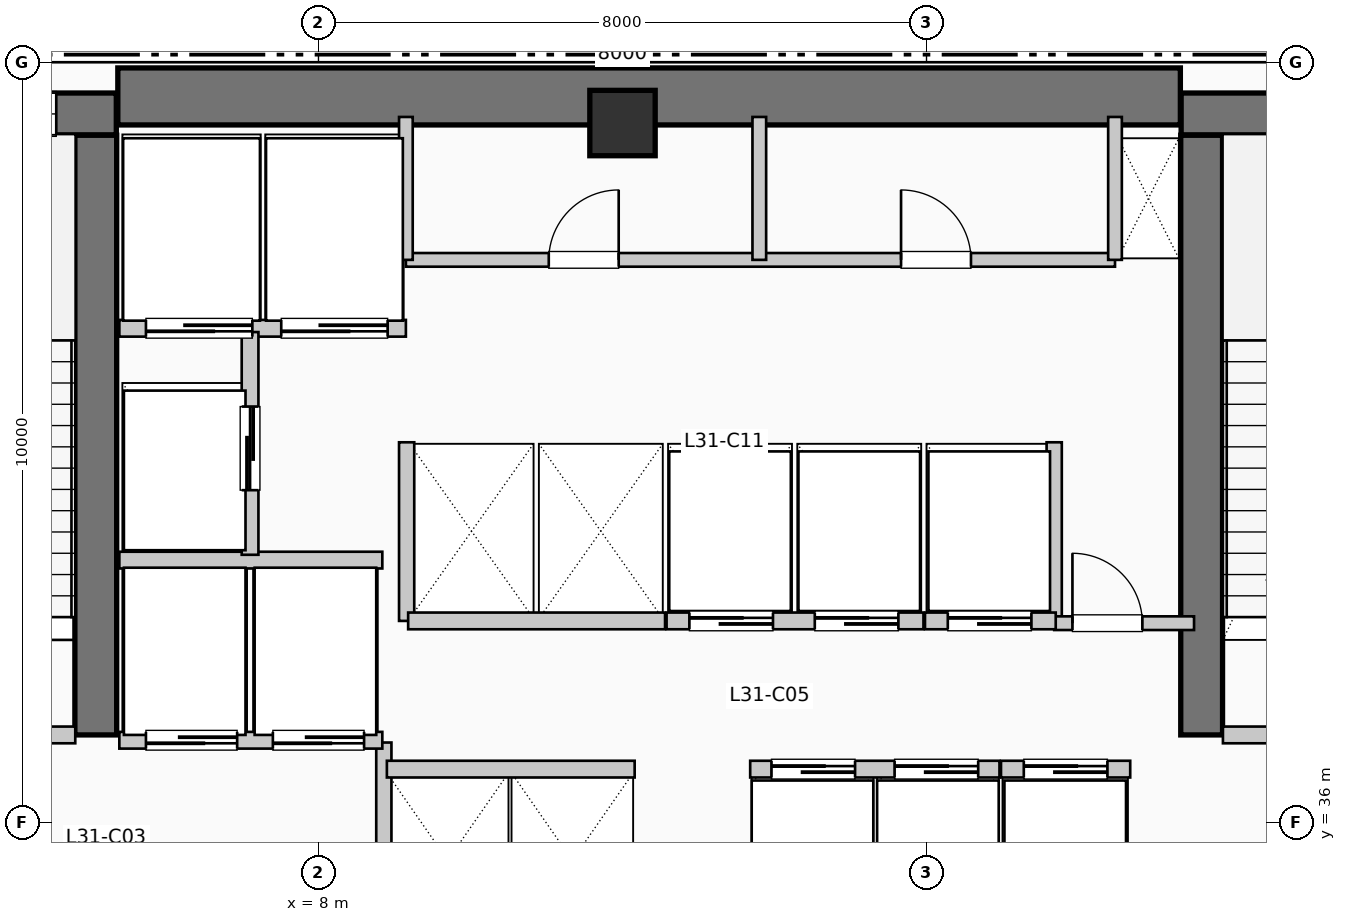
"""IFC4 building model, lengths in metres.
Left out: names, types, materials, properties, quantities, classifications, styles, units other than length and angle.
Written with IfcOpenShell. Run it as: python <this file> out.ifc"""

import sys

from ifc_helpers import new_model, si_unit, direction, frame, frame_2d, origin, origin_2d, place, context, subcontext, project, spatial, rectangle, extrude, element, fill, save


model = new_model("IFC4")
c1 = context("Model", 3, precision=1e-05, world=origin(), true_north=direction((0.0, 1.0)))
c2 = subcontext(c1, "Body", "Model", "MODEL_VIEW")
j1 = project(units=[si_unit("LENGTHUNIT", "METRE"), si_unit("PLANEANGLEUNIT", "RADIAN")], contexts=[c1])
p1 = place(None, origin())
s1 = spatial("IfcSite", under=j1, at=p1, CompositionType="ELEMENT")
p2 = place(p1, origin())
s2 = spatial("IfcBuilding", under=s1, at=p2, CompositionType="ELEMENT")
p3 = place(p2, frame((0.0, 0.0, 130.35)))
s3 = spatial("IfcBuildingStorey", under=s2, at=p3, CompositionType="ELEMENT", Elevation=130.35)
p4 = place(p3, frame((5.36, 45.55, 0.0), z_axis=(0.0, 0.0, 1.0), x_axis=(1.0, 0.0, 0.0)))
e1 = element("IfcWall", 1, at=p4, inside=s3, PredefinedType="SHEAR", context=c2, shape_type="SweptSolid", body=[
    extrude(rectangle(XDim=13.98, YDim=0.75, at=frame_2d((6.99, 0.0))), origin(), (0.0, 0.0, 1.0), 4.62),
])
p5 = place(p3, frame((5.07, 37.15, 0.0), z_axis=(0.0, 0.0, 1.0), x_axis=(0.0, 1.0, 0.0)))
e2 = element("IfcWall", 2, at=p5, inside=s3, PredefinedType="SHEAR", context=c2, shape_type="SweptSolid", body=[
    extrude(rectangle(XDim=7.89, YDim=0.55, at=frame_2d((3.945, 0.0))), origin(), (0.0, 0.0, 1.0), 4.62),
])
p6 = place(p3, frame((1.1, 45.32, 0.0), z_axis=(0.0, 0.0, 1.0), x_axis=(1.0, 0.0, 0.0)))
e3 = element("IfcWall", 3, at=p6, inside=s3, PredefinedType="SHEAR", context=c2, shape_type="SweptSolid", body=[
    extrude(rectangle(XDim=4.24, YDim=0.55, at=frame_2d((2.12, 0.0))), origin(), (0.0, 0.0, 1.0), 4.62),
])
p7 = place(p6, frame((2.05, 0.0, 1.05)))
e4 = element("IfcOpeningElement", 4, at=p7, cuts=e3, PredefinedType="OPENING", context=c2, shape_type="SweptSolid", body=[
    extrude(rectangle(XDim=1.4, YDim=1.8, at=frame_2d((0.7, 0.9))), frame((0.0, 0.285, 0.0), z_axis=(0.0, -1.0, 0.0), x_axis=(1.0, 0.0, 0.0)), (0.0, 0.0, 1.0), 0.57),
])
p8 = place(p3, frame((19.62, 37.15, 0.0), z_axis=(0.0, 0.0, 1.0), x_axis=(0.0, 1.0, 0.0)))
e5 = element("IfcWall", 5, at=p8, inside=s3, PredefinedType="SHEAR", context=c2, shape_type="SweptSolid", body=[
    extrude(rectangle(XDim=7.89, YDim=0.55, at=frame_2d((3.945, 0.0))), origin(), (0.0, 0.0, 1.0), 4.62),
])
p9 = place(p3, frame((19.35, 45.32, 0.0), z_axis=(0.0, 0.0, 1.0), x_axis=(1.0, 0.0, 0.0)))
e6 = element("IfcWall", 6, at=p9, inside=s3, PredefinedType="SHEAR", context=c2, shape_type="SweptSolid", body=[
    extrude(rectangle(XDim=3.69, YDim=0.55, at=frame_2d((1.845, 0.0))), origin(), (0.0, 0.0, 1.0), 4.62),
])
p10 = place(p9, frame((1.15, 0.0, 1.05)))
e7 = element("IfcOpeningElement", 7, at=p10, cuts=e6, PredefinedType="OPENING", context=c2, shape_type="SweptSolid", body=[
    extrude(rectangle(XDim=1.4, YDim=1.8, at=frame_2d((0.7, 0.9))), frame((0.0, 0.285, 0.0), z_axis=(0.0, -1.0, 0.0), x_axis=(1.0, 0.0, 0.0)), (0.0, 0.0, 1.0), 0.57),
])
p11 = place(p3, frame((12.0, 45.2, 0.0), z_axis=(0.0, 0.0, 1.0), x_axis=(1.0, 0.0, 0.0)))
e8 = element("IfcColumn", 8, at=p11, inside=s3, PredefinedType="COLUMN", context=c2, shape_type="SweptSolid", body=[
    extrude(rectangle(XDim=0.86, YDim=0.86, at=origin_2d()), origin(), (0.0, 0.0, 1.0), 4.62),
])
p12 = place(p3, frame((1.65, 37.15, 0.0), z_axis=(0.0, 0.0, 1.0), x_axis=(1.0, 0.0, 0.0)))
e9 = element("IfcWall", 9, at=p12, inside=s3, PredefinedType="PARTITIONING", context=c2, shape_type="SweptSolid", body=[
    extrude(rectangle(XDim=3.15, YDim=0.22, at=frame_2d((1.575, 0.0))), origin(), (0.0, 0.0, 1.0), 4.37),
])
p13 = place(p12, frame((2.05, 0.0, 0.0), z_axis=(0.0, 0.0, 1.0), x_axis=(-1.0, 0.0, 0.0)))
e10 = element("IfcOpeningElement", 10, at=p13, cuts=e9, PredefinedType="OPENING", context=c2, shape_type="SweptSolid", body=[
    extrude(rectangle(XDim=1.05, YDim=2.15, at=frame_2d((0.525, 1.075))), frame((0.0, 0.12, 0.0), z_axis=(0.0, -1.0, 0.0), x_axis=(1.0, 0.0, 0.0)), (0.0, 0.0, 1.0), 0.24),
])
p14 = place(p3, frame((8.86, 34.55, 0.0), z_axis=(0.0, 0.0, 1.0), x_axis=(0.0, 1.0, 0.0)))
e11 = element("IfcWall", 11, at=p14, inside=s3, PredefinedType="PARTITIONING", context=c2, shape_type="SweptSolid", body=[
    extrude(rectangle(XDim=2.5, YDim=0.2, at=frame_2d((1.25, 0.0))), origin(), (0.0, 0.0, 1.0), 4.37),
])
p15 = place(p3, frame((19.9, 37.15, 0.0), z_axis=(0.0, 0.0, 1.0), x_axis=(1.0, 0.0, 0.0)))
e12 = element("IfcWall", 12, at=p15, inside=s3, PredefinedType="PARTITIONING", context=c2, shape_type="SweptSolid", body=[
    extrude(rectangle(XDim=3.15, YDim=0.22, at=frame_2d((1.575, 0.0))), origin(), (0.0, 0.0, 1.0), 4.37),
])
p16 = place(p15, frame((2.05, 0.0, 0.0), z_axis=(0.0, 0.0, 1.0), x_axis=(-1.0, 0.0, 0.0)))
e13 = element("IfcOpeningElement", 13, at=p16, cuts=e12, PredefinedType="OPENING", context=c2, shape_type="SweptSolid", body=[
    extrude(rectangle(XDim=1.05, YDim=2.15, at=frame_2d((0.525, 1.075))), frame((0.0, 0.12, 0.0), z_axis=(0.0, -1.0, 0.0), x_axis=(1.0, 0.0, 0.0)), (0.0, 0.0, 1.0), 0.24),
])
p17 = place(p3, frame((5.38, 37.08, 0.0), z_axis=(0.0, 0.0, 1.0), x_axis=(1.0, 0.0, 0.0)))
e14 = element("IfcWall", 14, at=p17, inside=s3, PredefinedType="PARTITIONING", context=c2, shape_type="SweptSolid", body=[
    extrude(rectangle(XDim=3.46, YDim=0.22, at=frame_2d((1.73, 0.0))), origin(), (0.0, 0.0, 1.0), 4.37),
])
p18 = place(p17, frame((1.55, 0.0, 0.0), z_axis=(0.0, 0.0, 1.0), x_axis=(-1.0, 0.0, 0.0)))
e15 = element("IfcOpeningElement", 15, at=p18, cuts=e14, PredefinedType="OPENING", context=c2, shape_type="SweptSolid", body=[
    extrude(rectangle(XDim=1.2, YDim=2.2, at=frame_2d((0.6, 1.1))), frame((0.0, 0.12, 0.0), z_axis=(0.0, -1.0, 0.0), x_axis=(1.0, 0.0, 0.0)), (0.0, 0.0, 1.0), 0.24),
])
p19 = place(p17, frame((3.22, 0.0, 0.0), z_axis=(0.0, 0.0, 1.0), x_axis=(-1.0, 0.0, 0.0)))
e16 = element("IfcOpeningElement", 16, at=p19, cuts=e14, PredefinedType="OPENING", context=c2, shape_type="SweptSolid", body=[
    extrude(rectangle(XDim=1.2, YDim=2.2, at=frame_2d((0.6, 1.1))), frame((0.0, 0.12, 0.0), z_axis=(0.0, -1.0, 0.0), x_axis=(1.0, 0.0, 0.0)), (0.0, 0.0, 1.0), 0.24),
])
p20 = place(p3, frame((5.38, 39.45, 0.0), z_axis=(0.0, 0.0, 1.0), x_axis=(1.0, 0.0, 0.0)))
e17 = element("IfcWall", 17, at=p20, inside=s3, PredefinedType="PARTITIONING", context=c2, shape_type="SweptSolid", body=[
    extrude(rectangle(XDim=3.46, YDim=0.22, at=frame_2d((1.73, 0.0))), origin(), (0.0, 0.0, 1.0), 4.37),
])
p21 = place(p3, frame((5.38, 42.5, 0.0), z_axis=(0.0, 0.0, 1.0), x_axis=(1.0, 0.0, 0.0)))
e18 = element("IfcWall", 18, at=p21, inside=s3, PredefinedType="PARTITIONING", context=c2, shape_type="SweptSolid", body=[
    extrude(rectangle(XDim=3.77, YDim=0.22, at=frame_2d((1.885, 0.0))), origin(), (0.0, 0.0, 1.0), 4.37),
])
p22 = place(p21, frame((1.75, 0.0, 0.0), z_axis=(0.0, 0.0, 1.0), x_axis=(-1.0, 0.0, 0.0)))
e19 = element("IfcOpeningElement", 19, at=p22, cuts=e18, PredefinedType="OPENING", context=c2, shape_type="SweptSolid", body=[
    extrude(rectangle(XDim=1.4, YDim=2.2, at=frame_2d((0.7, 1.1))), frame((0.0, 0.12, 0.0), z_axis=(0.0, -1.0, 0.0), x_axis=(1.0, 0.0, 0.0)), (0.0, 0.0, 1.0), 0.24),
])
p23 = place(p21, frame((3.53, 0.0, 0.0), z_axis=(0.0, 0.0, 1.0), x_axis=(-1.0, 0.0, 0.0)))
e20 = element("IfcOpeningElement", 20, at=p23, cuts=e18, PredefinedType="OPENING", context=c2, shape_type="SweptSolid", body=[
    extrude(rectangle(XDim=1.4, YDim=2.2, at=frame_2d((0.7, 1.1))), frame((0.0, 0.12, 0.0), z_axis=(0.0, -1.0, 0.0), x_axis=(1.0, 0.0, 0.0)), (0.0, 0.0, 1.0), 0.24),
])
p24 = place(p3, frame((7.1, 39.52, 0.0), z_axis=(0.0, 0.0, 1.0), x_axis=(0.0, 1.0, 0.0)))
e21 = element("IfcWall", 21, at=p24, inside=s3, PredefinedType="PARTITIONING", context=c2, shape_type="SweptSolid", body=[
    extrude(rectangle(XDim=2.93, YDim=0.22, at=frame_2d((1.465, 0.0))), origin(), (0.0, 0.0, 1.0), 4.37),
])
p25 = place(p24, frame((0.85, 0.0, 0.0)))
e22 = element("IfcOpeningElement", 22, at=p25, cuts=e21, PredefinedType="OPENING", context=c2, shape_type="SweptSolid", body=[
    extrude(rectangle(XDim=1.1, YDim=2.2, at=frame_2d((0.55, 1.1))), frame((0.0, 0.12, 0.0), z_axis=(0.0, -1.0, 0.0), x_axis=(1.0, 0.0, 0.0)), (0.0, 0.0, 1.0), 0.24),
])
for number, where, z_axis, x_axis in (
    (23, (9.16, 38.65, 0.0), (0.0, 0.0, 1.0), (0.0, 1.0, 0.0)),
    (24, (17.68, 38.65, 0.0), (0.0, 0.0, 1.0), (0.0, 1.0, 0.0)),
):
    element("IfcWall", number, at=place(p3, frame(where, z_axis=z_axis, x_axis=x_axis)), inside=s3, PredefinedType="PARTITIONING", context=c2, shape_type="SweptSolid", body=[
        extrude(rectangle(XDim=2.35, YDim=0.2, at=frame_2d((1.175, 0.0))), origin(), (0.0, 0.0, 1.0), 4.37),
    ])
p26 = place(p3, frame((17.68, 38.62, 0.0), z_axis=(0.0, 0.0, 1.0), x_axis=(1.0, 0.0, 0.0)))
e25 = element("IfcWall", 25, at=p26, inside=s3, PredefinedType="PARTITIONING", context=c2, shape_type="SweptSolid", body=[
    extrude(rectangle(XDim=1.84, YDim=0.18, at=frame_2d((0.92, 0.0))), origin(), (0.0, 0.0, 1.0), 4.37),
])
p27 = place(p26, frame((0.24, 0.0, 0.0)))
e26 = element("IfcOpeningElement", 26, at=p27, cuts=e25, PredefinedType="OPENING", context=c2, shape_type="SweptSolid", body=[
    extrude(rectangle(XDim=0.92, YDim=2.1, at=frame_2d((0.46, 1.05))), frame((0.0, 0.1, 0.0), z_axis=(0.0, -1.0, 0.0), x_axis=(1.0, 0.0, 0.0)), (0.0, 0.0, 1.0), 0.2),
])
p28 = place(p3, frame((8.9, 36.7, 0.0), z_axis=(0.0, 0.0, 1.0), x_axis=(1.0, 0.0, 0.0)))
e27 = element("IfcWall", 27, at=p28, inside=s3, PredefinedType="PARTITIONING", context=c2, shape_type="SweptSolid", body=[
    extrude(rectangle(XDim=3.26, YDim=0.22, at=frame_2d((1.63, 0.0))), origin(), (0.0, 0.0, 1.0), 4.37),
])
p29 = place(p3, frame((9.18, 38.65, 0.0), z_axis=(0.0, 0.0, 1.0), x_axis=(1.0, 0.0, 0.0)))
e28 = element("IfcWall", 28, at=p29, inside=s3, PredefinedType="PARTITIONING", context=c2, shape_type="SweptSolid", body=[
    extrude(rectangle(XDim=3.38, YDim=0.22, at=frame_2d((1.69, 0.0))), origin(), (0.0, 0.0, 1.0), 4.37),
])
p30 = place(p3, frame((13.68, 36.7, 0.0), z_axis=(0.0, 0.0, 1.0), x_axis=(1.0, 0.0, 0.0)))
e29 = element("IfcWall", 29, at=p30, inside=s3, PredefinedType="PARTITIONING", context=c2, shape_type="SweptSolid", body=[
    extrude(rectangle(XDim=3.28, YDim=0.22, at=frame_2d((1.64, 0.0))), origin(), (0.0, 0.0, 1.0), 4.37),
])
p31 = place(p30, frame((0.28, 0.0, 0.0)))
e30 = element("IfcOpeningElement", 30, at=p31, cuts=e29, PredefinedType="OPENING", context=c2, shape_type="SweptSolid", body=[
    extrude(rectangle(XDim=1.1, YDim=2.2, at=frame_2d((0.55, 1.1))), frame((0.0, 0.12, 0.0), z_axis=(0.0, -1.0, 0.0), x_axis=(1.0, 0.0, 0.0)), (0.0, 0.0, 1.0), 0.24),
])
p32 = place(p30, frame((1.9, 0.0, 0.0)))
e31 = element("IfcOpeningElement", 31, at=p32, cuts=e29, PredefinedType="OPENING", context=c2, shape_type="SweptSolid", body=[
    extrude(rectangle(XDim=1.1, YDim=2.2, at=frame_2d((0.55, 1.1))), frame((0.0, 0.12, 0.0), z_axis=(0.0, -1.0, 0.0), x_axis=(1.0, 0.0, 0.0)), (0.0, 0.0, 1.0), 0.24),
])
p33 = place(p3, frame((12.58, 38.65, 0.0), z_axis=(0.0, 0.0, 1.0), x_axis=(1.0, 0.0, 0.0)))
e32 = element("IfcWall", 32, at=p33, inside=s3, PredefinedType="PARTITIONING", context=c2, shape_type="SweptSolid", body=[
    extrude(rectangle(XDim=3.38, YDim=0.22, at=frame_2d((1.69, 0.0))), origin(), (0.0, 0.0, 1.0), 4.37),
])
p34 = place(p33, frame((0.3, 0.0, 0.0)))
e33 = element("IfcOpeningElement", 33, at=p34, cuts=e32, PredefinedType="OPENING", context=c2, shape_type="SweptSolid", body=[
    extrude(rectangle(XDim=1.1, YDim=2.2, at=frame_2d((0.55, 1.1))), frame((0.0, 0.12, 0.0), z_axis=(0.0, -1.0, 0.0), x_axis=(1.0, 0.0, 0.0)), (0.0, 0.0, 1.0), 0.24),
])
p35 = place(p33, frame((1.95, 0.0, 0.0)))
e34 = element("IfcOpeningElement", 34, at=p35, cuts=e32, PredefinedType="OPENING", context=c2, shape_type="SweptSolid", body=[
    extrude(rectangle(XDim=1.1, YDim=2.2, at=frame_2d((0.55, 1.1))), frame((0.0, 0.12, 0.0), z_axis=(0.0, -1.0, 0.0), x_axis=(1.0, 0.0, 0.0)), (0.0, 0.0, 1.0), 0.24),
])
p36 = place(p3, frame((16.98, 36.7, 0.0), z_axis=(0.0, 0.0, 1.0), x_axis=(1.0, 0.0, 0.0)))
e35 = element("IfcWall", 35, at=p36, inside=s3, PredefinedType="PARTITIONING", context=c2, shape_type="SweptSolid", body=[
    extrude(rectangle(XDim=1.7, YDim=0.22, at=frame_2d((0.85, 0.0))), origin(), (0.0, 0.0, 1.0), 4.37),
])
p37 = place(p36, frame((0.3, 0.0, 0.0)))
e36 = element("IfcOpeningElement", 36, at=p37, cuts=e35, PredefinedType="OPENING", context=c2, shape_type="SweptSolid", body=[
    extrude(rectangle(XDim=1.1, YDim=2.2, at=frame_2d((0.55, 1.1))), frame((0.0, 0.12, 0.0), z_axis=(0.0, -1.0, 0.0), x_axis=(1.0, 0.0, 0.0)), (0.0, 0.0, 1.0), 0.24),
])
p38 = place(p3, frame((15.98, 38.65, 0.0), z_axis=(0.0, 0.0, 1.0), x_axis=(1.0, 0.0, 0.0)))
e37 = element("IfcWall", 37, at=p38, inside=s3, PredefinedType="PARTITIONING", context=c2, shape_type="SweptSolid", body=[
    extrude(rectangle(XDim=1.72, YDim=0.22, at=frame_2d((0.86, 0.0))), origin(), (0.0, 0.0, 1.0), 4.37),
])
p39 = place(p38, frame((0.3, 0.0, 0.0)))
e38 = element("IfcOpeningElement", 38, at=p39, cuts=e37, PredefinedType="OPENING", context=c2, shape_type="SweptSolid", body=[
    extrude(rectangle(XDim=1.1, YDim=2.2, at=frame_2d((0.55, 1.1))), frame((0.0, 0.12, 0.0), z_axis=(0.0, -1.0, 0.0), x_axis=(1.0, 0.0, 0.0)), (0.0, 0.0, 1.0), 0.24),
])
p40 = place(p3, frame((9.15, 43.4, 0.0), z_axis=(0.0, 0.0, 1.0), x_axis=(1.0, 0.0, 0.0)))
e39 = element("IfcWall", 39, at=p40, inside=s3, PredefinedType="PLUMBINGWALL", context=c2, shape_type="SweptSolid", body=[
    extrude(rectangle(XDim=9.33, YDim=0.18, at=frame_2d((4.665, 0.0))), origin(), (0.0, 0.0, 1.0), 4.37),
])
p41 = place(p40, frame((1.88, 0.0, 0.0)))
e40 = element("IfcOpeningElement", 40, at=p41, cuts=e39, PredefinedType="OPENING", context=c2, shape_type="SweptSolid", body=[
    extrude(rectangle(XDim=0.92, YDim=2.1, at=frame_2d((0.46, 1.05))), frame((0.0, 0.1, 0.0), z_axis=(0.0, -1.0, 0.0), x_axis=(1.0, 0.0, 0.0)), (0.0, 0.0, 1.0), 0.2),
])
p42 = place(p40, frame((6.515, 0.0, 0.0)))
e41 = element("IfcOpeningElement", 41, at=p42, cuts=e39, PredefinedType="OPENING", context=c2, shape_type="SweptSolid", body=[
    extrude(rectangle(XDim=0.92, YDim=2.1, at=frame_2d((0.46, 1.05))), frame((0.0, 0.1, 0.0), z_axis=(0.0, -1.0, 0.0), x_axis=(1.0, 0.0, 0.0)), (0.0, 0.0, 1.0), 0.2),
])
for number, where, z_axis, x_axis in (
    (42, (9.15, 43.4, 0.0), (0.0, 0.0, 1.0), (0.0, 1.0, 0.0)),
    (43, (18.48, 43.4, 0.0), (0.0, 0.0, 1.0), (0.0, 1.0, 0.0)),
    (44, (13.8, 43.4, 0.0), (0.0, 0.0, 1.0), (0.0, 1.0, 0.0)),
):
    element("IfcWall", number, at=place(p3, frame(where, z_axis=z_axis, x_axis=x_axis)), inside=s3, PredefinedType="PLUMBINGWALL", context=c2, shape_type="SweptSolid", body=[
        extrude(rectangle(XDim=1.88, YDim=0.18, at=frame_2d((0.94, 0.0))), origin(), (0.0, 0.0, 1.0), 4.37),
    ])
p43 = place(p7, origin())
e45 = element("IfcWindow", 45, at=p43, inside=s3, PartitioningType="SINGLE_PANEL", PredefinedType="WINDOW", context=c2, shape_type="SweptSolid", body=[
    extrude(rectangle(XDim=1.4, YDim=1.8, at=frame_2d((0.7, 0.9))), frame((0.0, 0.03, 0.0), z_axis=(0.0, -1.0, 0.0), x_axis=(1.0, 0.0, 0.0)), (0.0, 0.0, 1.0), 0.06),
])
fill(e4, e45)
p44 = place(p18, origin())
e46 = element("IfcDoor", 46, at=p44, inside=s3, OperationType="SLIDING_TO_RIGHT", PredefinedType="DOOR", context=c2, shape_type="SweptSolid", body=[
    extrude(rectangle(XDim=1.2, YDim=2.2, at=frame_2d((0.6, 1.1))), frame((0.0, 0.025, 0.0), z_axis=(0.0, -1.0, 0.0), x_axis=(1.0, 0.0, 0.0)), (0.0, 0.0, 1.0), 0.05),
])
fill(e15, e46)
p45 = place(p19, origin())
e47 = element("IfcDoor", 47, at=p45, inside=s3, OperationType="SLIDING_TO_RIGHT", PredefinedType="DOOR", context=c2, shape_type="SweptSolid", body=[
    extrude(rectangle(XDim=1.2, YDim=2.2, at=frame_2d((0.6, 1.1))), frame((0.0, 0.025, 0.0), z_axis=(0.0, -1.0, 0.0), x_axis=(1.0, 0.0, 0.0)), (0.0, 0.0, 1.0), 0.05),
])
fill(e16, e47)
p46 = place(p22, origin())
e48 = element("IfcDoor", 48, at=p46, inside=s3, OperationType="SLIDING_TO_LEFT", PredefinedType="DOOR", context=c2, shape_type="SweptSolid", body=[
    extrude(rectangle(XDim=1.4, YDim=2.2, at=frame_2d((0.7, 1.1))), frame((0.0, 0.025, 0.0), z_axis=(0.0, -1.0, 0.0), x_axis=(1.0, 0.0, 0.0)), (0.0, 0.0, 1.0), 0.05),
])
fill(e19, e48)
p47 = place(p23, origin())
e49 = element("IfcDoor", 49, at=p47, inside=s3, OperationType="SLIDING_TO_LEFT", PredefinedType="DOOR", context=c2, shape_type="SweptSolid", body=[
    extrude(rectangle(XDim=1.4, YDim=2.2, at=frame_2d((0.7, 1.1))), frame((0.0, 0.025, 0.0), z_axis=(0.0, -1.0, 0.0), x_axis=(1.0, 0.0, 0.0)), (0.0, 0.0, 1.0), 0.05),
])
fill(e20, e49)
p48 = place(p25, origin())
e50 = element("IfcDoor", 50, at=p48, inside=s3, OperationType="SLIDING_TO_LEFT", PredefinedType="DOOR", context=c2, shape_type="SweptSolid", body=[
    extrude(rectangle(XDim=1.1, YDim=2.2, at=frame_2d((0.55, 1.1))), frame((0.0, 0.025, 0.0), z_axis=(0.0, -1.0, 0.0), x_axis=(1.0, 0.0, 0.0)), (0.0, 0.0, 1.0), 0.05),
])
fill(e22, e50)
p49 = place(p27, origin())
e51 = element("IfcDoor", 51, at=p49, inside=s3, OperationType="SINGLE_SWING_LEFT", PredefinedType="DOOR", context=c2, shape_type="SweptSolid", body=[
    extrude(rectangle(XDim=0.92, YDim=2.1, at=frame_2d((0.46, 1.05))), frame((0.0, 0.025, 0.0), z_axis=(0.0, -1.0, 0.0), x_axis=(1.0, 0.0, 0.0)), (0.0, 0.0, 1.0), 0.05),
])
fill(e26, e51)
p50 = place(p31, origin())
e52 = element("IfcDoor", 52, at=p50, inside=s3, OperationType="SLIDING_TO_RIGHT", PredefinedType="DOOR", context=c2, shape_type="SweptSolid", body=[
    extrude(rectangle(XDim=1.1, YDim=2.2, at=frame_2d((0.55, 1.1))), frame((0.0, 0.025, 0.0), z_axis=(0.0, -1.0, 0.0), x_axis=(1.0, 0.0, 0.0)), (0.0, 0.0, 1.0), 0.05),
])
fill(e30, e52)
p51 = place(p32, origin())
e53 = element("IfcDoor", 53, at=p51, inside=s3, OperationType="SLIDING_TO_RIGHT", PredefinedType="DOOR", context=c2, shape_type="SweptSolid", body=[
    extrude(rectangle(XDim=1.1, YDim=2.2, at=frame_2d((0.55, 1.1))), frame((0.0, 0.025, 0.0), z_axis=(0.0, -1.0, 0.0), x_axis=(1.0, 0.0, 0.0)), (0.0, 0.0, 1.0), 0.05),
])
fill(e31, e53)
p52 = place(p34, origin())
e54 = element("IfcDoor", 54, at=p52, inside=s3, OperationType="SLIDING_TO_RIGHT", PredefinedType="DOOR", context=c2, shape_type="SweptSolid", body=[
    extrude(rectangle(XDim=1.1, YDim=2.2, at=frame_2d((0.55, 1.1))), frame((0.0, 0.025, 0.0), z_axis=(0.0, -1.0, 0.0), x_axis=(1.0, 0.0, 0.0)), (0.0, 0.0, 1.0), 0.05),
])
fill(e33, e54)
p53 = place(p35, origin())
e55 = element("IfcDoor", 55, at=p53, inside=s3, OperationType="SLIDING_TO_RIGHT", PredefinedType="DOOR", context=c2, shape_type="SweptSolid", body=[
    extrude(rectangle(XDim=1.1, YDim=2.2, at=frame_2d((0.55, 1.1))), frame((0.0, 0.025, 0.0), z_axis=(0.0, -1.0, 0.0), x_axis=(1.0, 0.0, 0.0)), (0.0, 0.0, 1.0), 0.05),
])
fill(e34, e55)
p54 = place(p37, origin())
e56 = element("IfcDoor", 56, at=p54, inside=s3, OperationType="SLIDING_TO_LEFT", PredefinedType="DOOR", context=c2, shape_type="SweptSolid", body=[
    extrude(rectangle(XDim=1.1, YDim=2.2, at=frame_2d((0.55, 1.1))), frame((0.0, 0.025, 0.0), z_axis=(0.0, -1.0, 0.0), x_axis=(1.0, 0.0, 0.0)), (0.0, 0.0, 1.0), 0.05),
])
fill(e36, e56)
p55 = place(p39, origin())
e57 = element("IfcDoor", 57, at=p55, inside=s3, OperationType="SLIDING_TO_LEFT", PredefinedType="DOOR", context=c2, shape_type="SweptSolid", body=[
    extrude(rectangle(XDim=1.1, YDim=2.2, at=frame_2d((0.55, 1.1))), frame((0.0, 0.025, 0.0), z_axis=(0.0, -1.0, 0.0), x_axis=(1.0, 0.0, 0.0)), (0.0, 0.0, 1.0), 0.05),
])
fill(e38, e57)
p56 = place(p41, origin())
e58 = element("IfcDoor", 58, at=p56, inside=s3, OperationType="SINGLE_SWING_RIGHT", PredefinedType="DOOR", context=c2, shape_type="SweptSolid", body=[
    extrude(rectangle(XDim=0.92, YDim=2.1, at=frame_2d((0.46, 1.05))), frame((0.0, 0.025, 0.0), z_axis=(0.0, -1.0, 0.0), x_axis=(1.0, 0.0, 0.0)), (0.0, 0.0, 1.0), 0.05),
])
fill(e40, e58)
p57 = place(p42, origin())
e59 = element("IfcDoor", 59, at=p57, inside=s3, OperationType="SINGLE_SWING_LEFT", PredefinedType="DOOR", context=c2, shape_type="SweptSolid", body=[
    extrude(rectangle(XDim=0.92, YDim=2.1, at=frame_2d((0.46, 1.05))), frame((0.0, 0.025, 0.0), z_axis=(0.0, -1.0, 0.0), x_axis=(1.0, 0.0, 0.0)), (0.0, 0.0, 1.0), 0.05),
])
fill(e41, e59)
save(model, sys.argv[1])
